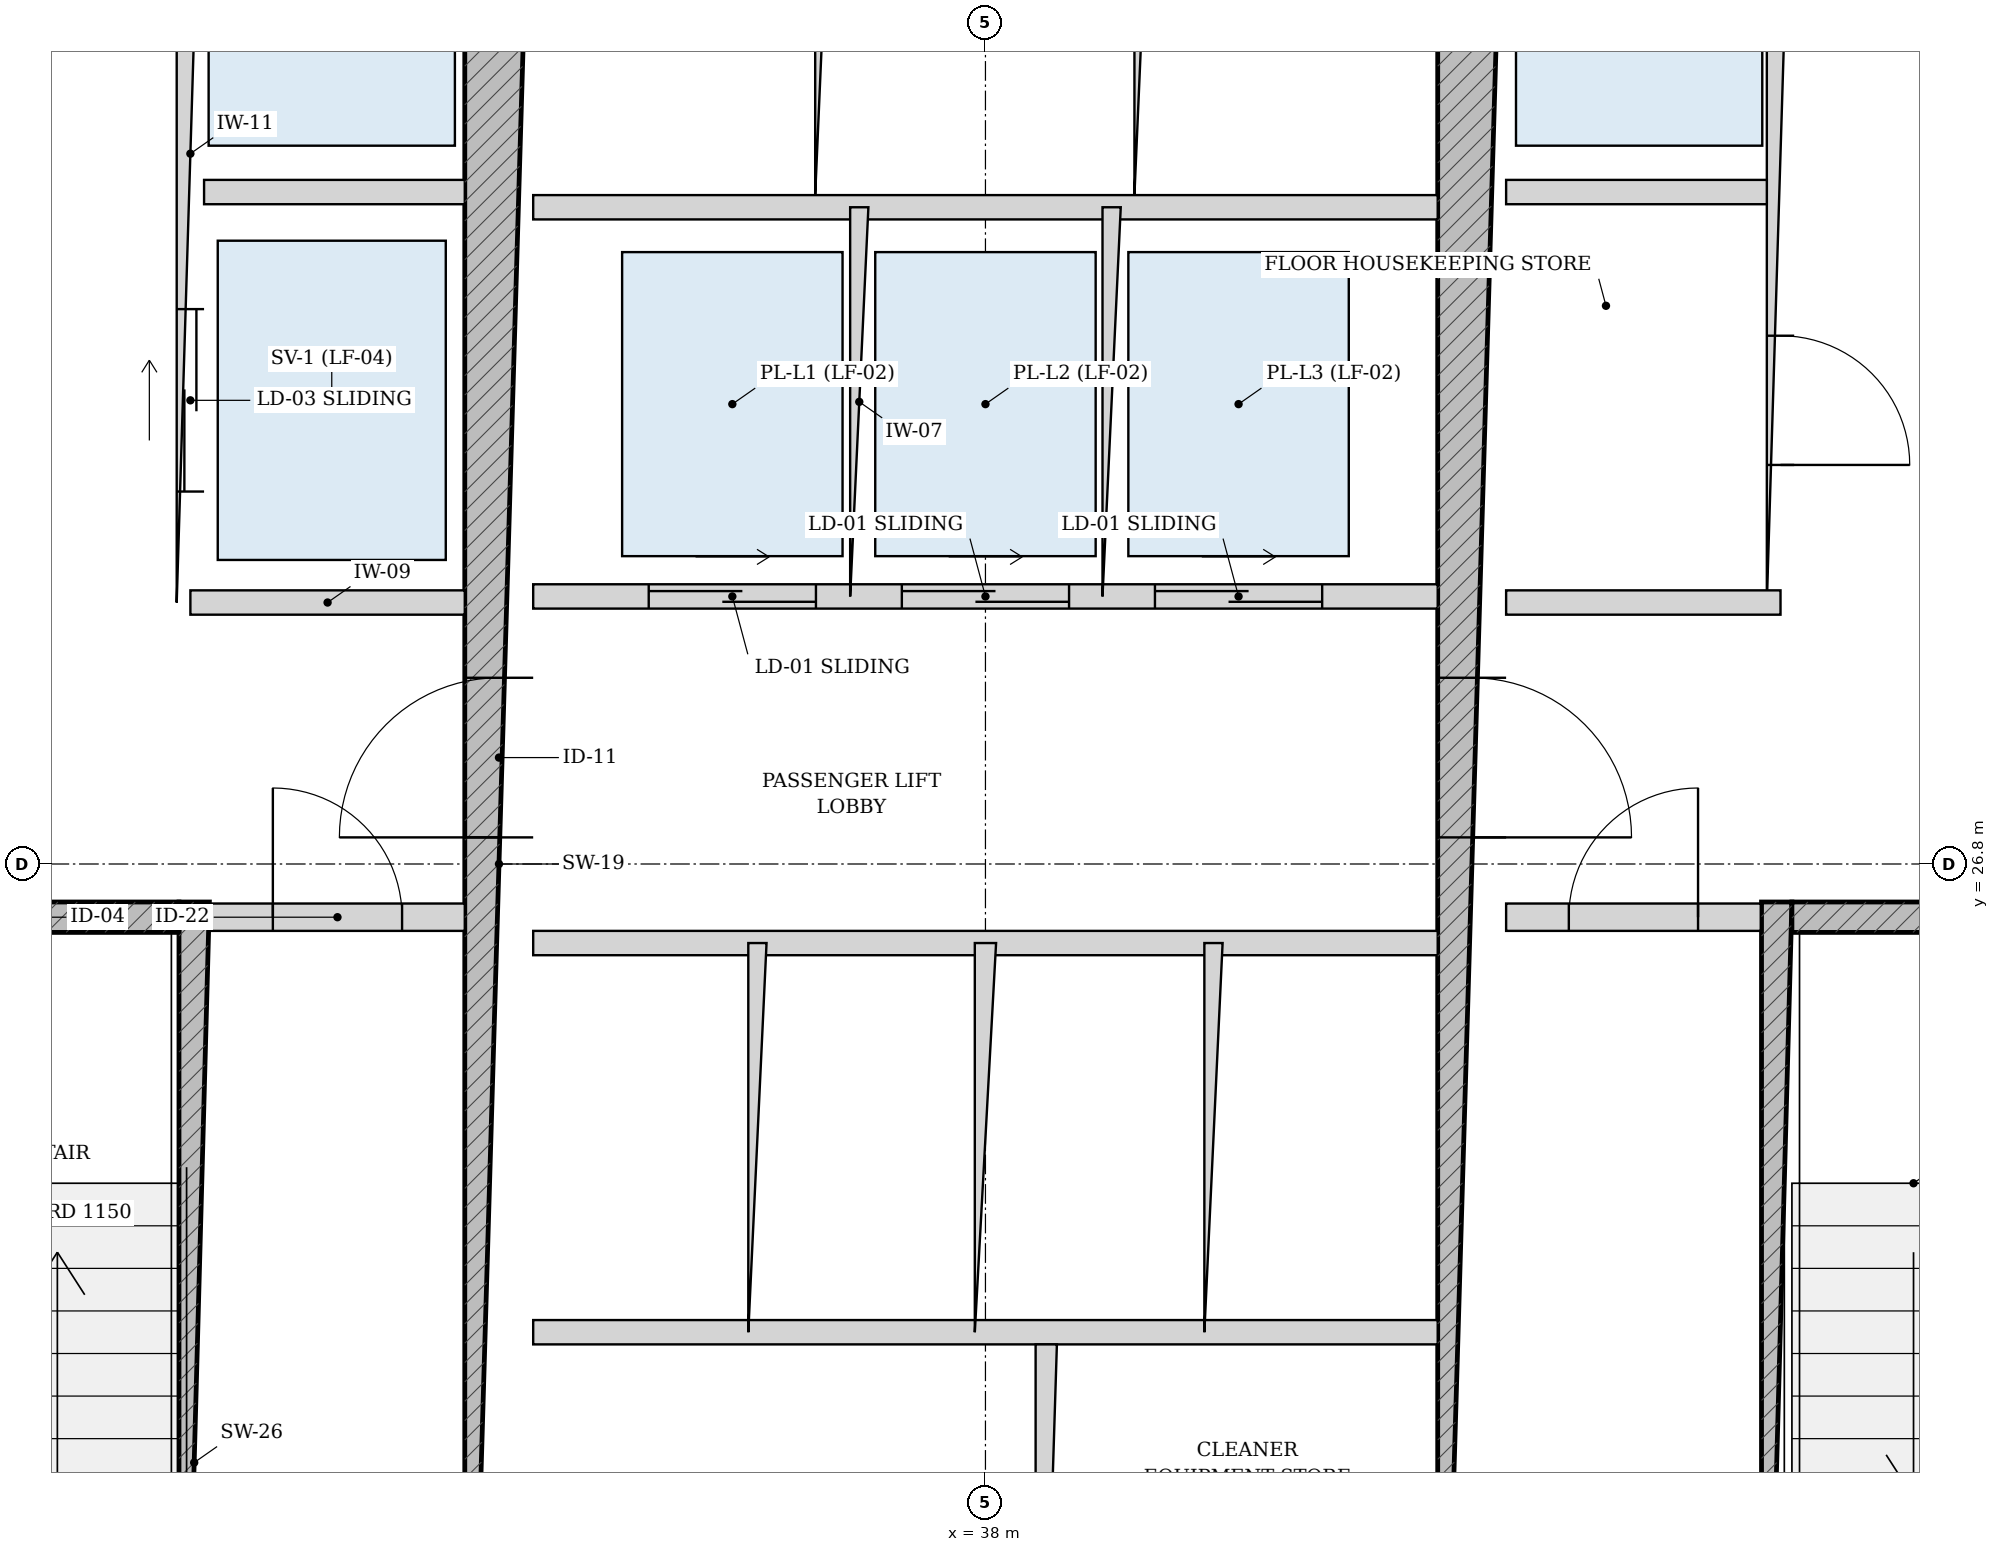
"""IFC4 building model, lengths in metres.
Left out: names, types, materials, properties, quantities, classifications, styles, units other than length and angle.
Written with IfcOpenShell. Run it as: python <this file> out.ifc"""

import sys

from ifc_helpers import new_model, si_unit, direction, frame, frame_2d, origin, place, context, subcontext, project, spatial, rectangle, extrude, source, transform, mapped, element, fill, save


model = new_model("IFC4")
c1 = context("Model", 3, precision=1e-05, world=origin(), true_north=direction((-0.2419218956, 0.970295726276)))
c2 = subcontext(c1, "Body", "Model", "MODEL_VIEW")
j1 = project(units=[si_unit("LENGTHUNIT", "METRE"), si_unit("PLANEANGLEUNIT", "RADIAN")], contexts=[c1])
p1 = place(None, origin())
s1 = spatial("IfcSite", under=j1, at=p1, CompositionType="ELEMENT")
p2 = place(p1, origin())
s2 = spatial("IfcBuilding", under=s1, at=p2, CompositionType="ELEMENT")
p3 = place(p2, frame((0.0, 0.0, 79.8)))
s3 = spatial("IfcBuildingStorey", under=s2, at=p3, CompositionType="ELEMENT", Elevation=79.8)
p4 = place(p3, frame((32.795, 19.175, 0.0), z_axis=(0.0, 0.0, 1.0), x_axis=(0.0, 1.0, 0.0)))
e1 = element("IfcWall", 1, at=p4, inside=s3, PredefinedType="SOLIDWALL", context=c2, shape_type="SweptSolid", body=[
    extrude(rectangle(XDim=7.375, YDim=0.2, at=frame_2d((3.688, 0.0))), origin(), (0.0, 0.0, 1.0), 3.325),
])
p5 = place(p3, frame((29.375, 26.45, 0.0), z_axis=(0.0, 0.0, 1.0), x_axis=(1.0, 0.0, 0.0)))
e2 = element("IfcWall", 2, at=p5, inside=s3, PredefinedType="SOLIDWALL", context=c2, shape_type="SweptSolid", body=[
    extrude(rectangle(XDim=3.32, YDim=0.2, at=frame_2d((1.66, 0.0))), origin(), (0.0, 0.0, 1.0), 3.325),
])
p6 = place(p5, frame((1.185, 0.0, 0.0)))
e3 = element("IfcOpeningElement", 3, at=p6, cuts=e2, PredefinedType="OPENING", context=c2, shape_type="SweptSolid", body=[
    extrude(rectangle(XDim=0.95, YDim=2.15, at=frame_2d((0.475, 1.075))), frame((0.0, 0.11, 0.0), z_axis=(0.0, -1.0, 0.0), x_axis=(1.0, 0.0, 0.0)), (0.0, 0.0, 1.0), 0.22),
])
p7 = place(p3, frame((43.205, 19.175, 0.0), z_axis=(0.0, 0.0, 1.0), x_axis=(0.0, 1.0, 0.0)))
e4 = element("IfcWall", 4, at=p7, inside=s3, PredefinedType="SOLIDWALL", context=c2, shape_type="SweptSolid", body=[
    extrude(rectangle(XDim=7.375, YDim=0.2, at=frame_2d((3.688, 0.0))), origin(), (0.0, 0.0, 1.0), 3.325),
])
p8 = place(p3, frame((43.305, 26.45, 0.0), z_axis=(0.0, 0.0, 1.0), x_axis=(1.0, 0.0, 0.0)))
e5 = element("IfcWall", 5, at=p8, inside=s3, PredefinedType="SOLIDWALL", context=c2, shape_type="SweptSolid", body=[
    extrude(rectangle(XDim=3.32, YDim=0.2, at=frame_2d((1.66, 0.0))), origin(), (0.0, 0.0, 1.0), 3.325),
])
p9 = place(p8, frame((1.185, 0.0, 0.0)))
e6 = element("IfcOpeningElement", 6, at=p9, cuts=e5, PredefinedType="OPENING", context=c2, shape_type="SweptSolid", body=[
    extrude(rectangle(XDim=0.95, YDim=2.15, at=frame_2d((0.475, 1.075))), frame((0.0, 0.11, 0.0), z_axis=(0.0, -1.0, 0.0), x_axis=(1.0, 0.0, 0.0)), (0.0, 0.0, 1.0), 0.22),
])
p10 = place(p3, frame((34.8, 19.175, 0.0), z_axis=(0.0, 0.0, 1.0), x_axis=(0.0, 1.0, 0.0)))
e7 = element("IfcWall", 7, at=p10, inside=s3, PredefinedType="SHEAR", context=c2, shape_type="SweptSolid", body=[
    extrude(rectangle(XDim=15.25, YDim=0.45, at=frame_2d((7.625, 0.0))), origin(), (0.0, 0.0, 1.0), 3.325),
])
p11 = place(p10, frame((7.8, 0.0, 0.0)))
e8 = element("IfcOpeningElement", 8, at=p11, cuts=e7, PredefinedType="OPENING", context=c2, shape_type="SweptSolid", body=[
    extrude(rectangle(XDim=1.05, YDim=2.15, at=frame_2d((0.525, 1.075))), frame((0.0, 0.235, 0.0), z_axis=(0.0, -1.0, 0.0), x_axis=(1.0, 0.0, 0.0)), (0.0, 0.0, 1.0), 0.47),
])
p12 = place(p3, frame((41.2, 19.175, 0.0), z_axis=(0.0, 0.0, 1.0), x_axis=(0.0, 1.0, 0.0)))
e9 = element("IfcWall", 9, at=p12, inside=s3, PredefinedType="SHEAR", context=c2, shape_type="SweptSolid", body=[
    extrude(rectangle(XDim=15.25, YDim=0.45, at=frame_2d((7.625, 0.0))), origin(), (0.0, 0.0, 1.0), 3.325),
])
p13 = place(p12, frame((7.8, 0.0, 0.0)))
e10 = element("IfcOpeningElement", 10, at=p13, cuts=e9, PredefinedType="OPENING", context=c2, shape_type="SweptSolid", body=[
    extrude(rectangle(XDim=1.05, YDim=2.15, at=frame_2d((0.525, 1.075))), frame((0.0, 0.235, 0.0), z_axis=(0.0, -1.0, 0.0), x_axis=(1.0, 0.0, 0.0)), (0.0, 0.0, 1.0), 0.47),
])
p14 = place(p3, frame((32.9, 26.45, 0.0), z_axis=(0.0, 0.0, 1.0), x_axis=(1.0, 0.0, 0.0)))
e11 = element("IfcWall", 11, at=p14, inside=s3, PredefinedType="PARTITIONING", context=c2, shape_type="SweptSolid", body=[
    extrude(rectangle(XDim=1.675, YDim=0.18, at=frame_2d((0.837, 0.0))), origin(), (0.0, 0.0, 1.0), 3.325),
])
p15 = place(p14, frame((0.413, 0.0, 0.0)))
e12 = element("IfcOpeningElement", 12, at=p15, cuts=e11, PredefinedType="OPENING", context=c2, shape_type="SweptSolid", body=[
    extrude(rectangle(XDim=0.85, YDim=2.1, at=frame_2d((0.425, 1.05))), frame((0.0, 0.1, 0.0), z_axis=(0.0, -1.0, 0.0), x_axis=(1.0, 0.0, 0.0)), (0.0, 0.0, 1.0), 0.2),
])
p16 = place(p3, frame((41.425, 26.45, 0.0), z_axis=(0.0, 0.0, 1.0), x_axis=(1.0, 0.0, 0.0)))
e13 = element("IfcWall", 13, at=p16, inside=s3, PredefinedType="PARTITIONING", context=c2, shape_type="SweptSolid", body=[
    extrude(rectangle(XDim=1.675, YDim=0.18, at=frame_2d((0.837, 0.0))), origin(), (0.0, 0.0, 1.0), 3.325),
])
p17 = place(p16, frame((0.413, 0.0, 0.0)))
e14 = element("IfcOpeningElement", 14, at=p17, cuts=e13, PredefinedType="OPENING", context=c2, shape_type="SweptSolid", body=[
    extrude(rectangle(XDim=0.85, YDim=2.1, at=frame_2d((0.425, 1.05))), frame((0.0, 0.1, 0.0), z_axis=(0.0, -1.0, 0.0), x_axis=(1.0, 0.0, 0.0)), (0.0, 0.0, 1.0), 0.2),
])
p18 = place(p3, frame((32.77, 28.52, 0.0), z_axis=(0.0, 0.0, 1.0), x_axis=(0.0, 1.0, 0.0)))
e15 = element("IfcWall", 15, at=p18, inside=s3, PredefinedType="PARTITIONING", context=c2, shape_type="SweptSolid", body=[
    extrude(rectangle(XDim=5.905, YDim=0.18, at=frame_2d((2.953, 0.0))), origin(), (0.0, 0.0, 1.0), 3.325),
])
p19 = place(p18, frame((3.655, 0.0, 0.0)))
e16 = element("IfcOpeningElement", 16, at=p19, cuts=e15, PredefinedType="OPENING", context=c2, shape_type="SweptSolid", body=[
    extrude(rectangle(XDim=1.15, YDim=2.2, at=frame_2d((0.575, 1.1))), frame((0.0, 0.1, 0.0), z_axis=(0.0, -1.0, 0.0), x_axis=(1.0, 0.0, 0.0)), (0.0, 0.0, 1.0), 0.2),
])
p20 = place(p18, frame((0.73, 0.0, 0.0)))
e17 = element("IfcOpeningElement", 17, at=p20, cuts=e15, PredefinedType="OPENING", context=c2, shape_type="SweptSolid", body=[
    extrude(rectangle(XDim=1.2, YDim=2.25, at=frame_2d((0.6, 1.125))), frame((0.0, 0.1, 0.0), z_axis=(0.0, -1.0, 0.0), x_axis=(1.0, 0.0, 0.0)), (0.0, 0.0, 1.0), 0.2),
])
p21 = place(p3, frame((32.86, 31.22, 0.0), z_axis=(0.0, 0.0, 1.0), x_axis=(1.0, 0.0, 0.0)))
e18 = element("IfcWall", 18, at=p21, inside=s3, PredefinedType="PARTITIONING", context=c2, shape_type="SweptSolid", body=[
    extrude(rectangle(XDim=1.715, YDim=0.16, at=frame_2d((0.857, 0.0))), origin(), (0.0, 0.0, 1.0), 3.325),
])
p22 = place(p3, frame((32.77, 28.52, 0.0), z_axis=(0.0, 0.0, 1.0), x_axis=(1.0, 0.0, 0.0)))
e19 = element("IfcWall", 19, at=p22, inside=s3, PredefinedType="PARTITIONING", context=c2, shape_type="SweptSolid", body=[
    extrude(rectangle(XDim=1.805, YDim=0.16, at=frame_2d((0.902, 0.0))), origin(), (0.0, 0.0, 1.0), 3.325),
])
p23 = place(p3, frame((43.23, 28.52, 0.0), z_axis=(0.0, 0.0, 1.0), x_axis=(0.0, 1.0, 0.0)))
e20 = element("IfcWall", 20, at=p23, inside=s3, PredefinedType="PARTITIONING", context=c2, shape_type="SweptSolid", body=[
    extrude(rectangle(XDim=5.905, YDim=0.18, at=frame_2d((2.953, 0.0))), origin(), (0.0, 0.0, 1.0), 3.325),
])
p24 = place(p23, frame((0.905, 0.0, 0.0)))
e21 = element("IfcOpeningElement", 21, at=p24, cuts=e20, PredefinedType="OPENING", context=c2, shape_type="SweptSolid", body=[
    extrude(rectangle(XDim=0.85, YDim=2.1, at=frame_2d((0.425, 1.05))), frame((0.0, 0.1, 0.0), z_axis=(0.0, -1.0, 0.0), x_axis=(1.0, 0.0, 0.0)), (0.0, 0.0, 1.0), 0.2),
])
p25 = place(p23, frame((3.655, 0.0, 0.0)))
e22 = element("IfcOpeningElement", 22, at=p25, cuts=e20, PredefinedType="OPENING", context=c2, shape_type="SweptSolid", body=[
    extrude(rectangle(XDim=1.15, YDim=2.2, at=frame_2d((0.575, 1.1))), frame((0.0, 0.1, 0.0), z_axis=(0.0, -1.0, 0.0), x_axis=(1.0, 0.0, 0.0)), (0.0, 0.0, 1.0), 0.2),
])
p26 = place(p3, frame((41.425, 31.22, 0.0), z_axis=(0.0, 0.0, 1.0), x_axis=(1.0, 0.0, 0.0)))
e23 = element("IfcWall", 23, at=p26, inside=s3, PredefinedType="PARTITIONING", context=c2, shape_type="SweptSolid", body=[
    extrude(rectangle(XDim=1.715, YDim=0.16, at=frame_2d((0.857, 0.0))), origin(), (0.0, 0.0, 1.0), 3.325),
])
p27 = place(p3, frame((41.425, 28.52, 0.0), z_axis=(0.0, 0.0, 1.0), x_axis=(1.0, 0.0, 0.0)))
e24 = element("IfcWall", 24, at=p27, inside=s3, PredefinedType="PARTITIONING", context=c2, shape_type="SweptSolid", body=[
    extrude(rectangle(XDim=1.805, YDim=0.16, at=frame_2d((0.902, 0.0))), origin(), (0.0, 0.0, 1.0), 3.325),
])
p28 = place(p3, frame((35.025, 28.56, 0.0), z_axis=(0.0, 0.0, 1.0), x_axis=(1.0, 0.0, 0.0)))
e25 = element("IfcWall", 25, at=p28, inside=s3, PredefinedType="PARTITIONING", context=c2, shape_type="SweptSolid", body=[
    extrude(rectangle(XDim=5.95, YDim=0.16, at=frame_2d((2.975, 0.0))), origin(), (0.0, 0.0, 1.0), 3.325),
])
p29 = place(p28, frame((0.76, 0.0, 0.0)))
e26 = element("IfcOpeningElement", 26, at=p29, cuts=e25, PredefinedType="OPENING", context=c2, shape_type="SweptSolid", body=[
    extrude(rectangle(XDim=1.1, YDim=2.2, at=frame_2d((0.55, 1.1))), frame((0.0, 0.09, 0.0), z_axis=(0.0, -1.0, 0.0), x_axis=(1.0, 0.0, 0.0)), (0.0, 0.0, 1.0), 0.18),
])
p30 = place(p28, frame((2.425, 0.0, 0.0)))
e27 = element("IfcOpeningElement", 27, at=p30, cuts=e25, PredefinedType="OPENING", context=c2, shape_type="SweptSolid", body=[
    extrude(rectangle(XDim=1.1, YDim=2.2, at=frame_2d((0.55, 1.1))), frame((0.0, 0.09, 0.0), z_axis=(0.0, -1.0, 0.0), x_axis=(1.0, 0.0, 0.0)), (0.0, 0.0, 1.0), 0.18),
])
p31 = place(p28, frame((4.09, 0.0, 0.0)))
e28 = element("IfcOpeningElement", 28, at=p31, cuts=e25, PredefinedType="OPENING", context=c2, shape_type="SweptSolid", body=[
    extrude(rectangle(XDim=1.1, YDim=2.2, at=frame_2d((0.55, 1.1))), frame((0.0, 0.09, 0.0), z_axis=(0.0, -1.0, 0.0), x_axis=(1.0, 0.0, 0.0)), (0.0, 0.0, 1.0), 0.18),
])
p32 = place(p3, frame((35.025, 31.12, 0.0), z_axis=(0.0, 0.0, 1.0), x_axis=(1.0, 0.0, 0.0)))
e29 = element("IfcWall", 29, at=p32, inside=s3, PredefinedType="PARTITIONING", context=c2, shape_type="SweptSolid", body=[
    extrude(rectangle(XDim=5.95, YDim=0.16, at=frame_2d((2.975, 0.0))), origin(), (0.0, 0.0, 1.0), 3.325),
])
for number, where, z_axis, x_axis in (
    (30, (37.17, 28.56, 0.0), (0.0, 0.0, 1.0), (0.0, 1.0, 0.0)),
    (31, (38.83, 28.56, 0.0), (0.0, 0.0, 1.0), (0.0, 1.0, 0.0)),
):
    element("IfcWall", number, at=place(p3, frame(where, z_axis=z_axis, x_axis=x_axis)), inside=s3, PredefinedType="PARTITIONING", context=c2, shape_type="SweptSolid", body=[
        extrude(rectangle(XDim=2.56, YDim=0.12, at=frame_2d((1.28, 0.0))), origin(), (0.0, 0.0, 1.0), 3.325),
    ])
for number, where, z_axis, x_axis in (
    (32, (36.95, 31.2, 0.0), (0.0, 0.0, 1.0), (0.0, 1.0, 0.0)),
    (33, (39.05, 31.2, 0.0), (0.0, 0.0, 1.0), (0.0, 1.0, 0.0)),
):
    element("IfcWall", number, at=place(p3, frame(where, z_axis=z_axis, x_axis=x_axis)), inside=s3, PredefinedType="PARTITIONING", context=c2, shape_type="SweptSolid", body=[
        extrude(rectangle(XDim=3.225, YDim=0.14, at=frame_2d((1.613, 0.0))), origin(), (0.0, 0.0, 1.0), 3.325),
    ])
for number, where, z_axis, x_axis in (
    (34, (35.025, 26.28, 0.0), (0.0, 0.0, 1.0), (1.0, 0.0, 0.0)),
    (35, (35.025, 23.72, 0.0), (0.0, 0.0, 1.0), (1.0, 0.0, 0.0)),
):
    element("IfcWall", number, at=place(p3, frame(where, z_axis=z_axis, x_axis=x_axis)), inside=s3, PredefinedType="PARTITIONING", context=c2, shape_type="SweptSolid", body=[
        extrude(rectangle(XDim=5.95, YDim=0.16, at=frame_2d((2.975, 0.0))), origin(), (0.0, 0.0, 1.0), 3.325),
    ])
p33 = place(p3, frame((36.5, 23.72, 0.0), z_axis=(0.0, 0.0, 1.0), x_axis=(0.0, 1.0, 0.0)))
e36 = element("IfcWall", 36, at=p33, inside=s3, PredefinedType="PARTITIONING", context=c2, shape_type="SweptSolid", body=[
    extrude(rectangle(XDim=2.56, YDim=0.12, at=frame_2d((1.28, 0.0))), origin(), (0.0, 0.0, 1.0), 3.325),
])
p34 = place(p3, frame((38.0, 23.72, 0.0), z_axis=(0.0, 0.0, 1.0), x_axis=(0.0, 1.0, 0.0)))
e37 = element("IfcWall", 37, at=p34, inside=s3, PredefinedType="PARTITIONING", context=c2, shape_type="SweptSolid", body=[
    extrude(rectangle(XDim=2.56, YDim=0.14, at=frame_2d((1.28, 0.0))), origin(), (0.0, 0.0, 1.0), 3.325),
])
p35 = place(p3, frame((39.5, 23.72, 0.0), z_axis=(0.0, 0.0, 1.0), x_axis=(0.0, 1.0, 0.0)))
e38 = element("IfcWall", 38, at=p35, inside=s3, PredefinedType="PARTITIONING", context=c2, shape_type="SweptSolid", body=[
    extrude(rectangle(XDim=2.56, YDim=0.12, at=frame_2d((1.28, 0.0))), origin(), (0.0, 0.0, 1.0), 3.325),
])
p36 = place(p3, frame((38.4, 19.175, 0.0), z_axis=(0.0, 0.0, 1.0), x_axis=(0.0, 1.0, 0.0)))
e39 = element("IfcWall", 39, at=p36, inside=s3, PredefinedType="PARTITIONING", context=c2, shape_type="SweptSolid", body=[
    extrude(rectangle(XDim=4.465, YDim=0.14, at=frame_2d((2.232, 0.0))), origin(), (0.0, 0.0, 1.0), 3.325),
])
m1 = source(origin(), c2, "Body", "SweptSolid", [
    extrude(rectangle(XDim=1.05, YDim=2.15, at=frame_2d((0.525, 1.075))), frame((0.0, 0.025, 0.0), z_axis=(0.0, -1.0, 0.0), x_axis=(1.0, 0.0, 0.0)), (0.0, 0.0, 1.0), 0.05),
])
p37 = place(p11, origin())
e40 = element("IfcDoor", 40, at=p37, inside=s3, OperationType="SINGLE_SWING_LEFT", PredefinedType="DOOR", context=c2, shape_type="MappedRepresentation", body=[
    mapped(m1, transform((0.0, 0.0, 0.0), scale=1.0)),
])
fill(e8, e40)
p38 = place(p13, frame((1.05, 0.0, 0.0), z_axis=(0.0, 0.0, 1.0), x_axis=(-1.0, 0.0, 0.0)))
e41 = element("IfcDoor", 41, at=p38, inside=s3, OperationType="SINGLE_SWING_RIGHT", PredefinedType="DOOR", context=c2, shape_type="MappedRepresentation", body=[
    mapped(m1, transform((0.0, 0.0, 0.0), scale=1.0)),
])
fill(e10, e41)
m2 = source(origin(), c2, "Body", "SweptSolid", [
    extrude(rectangle(XDim=0.85, YDim=2.1, at=frame_2d((0.425, 1.05))), frame((0.0, 0.025, 0.0), z_axis=(0.0, -1.0, 0.0), x_axis=(1.0, 0.0, 0.0)), (0.0, 0.0, 1.0), 0.05),
])
p39 = place(p15, origin())
e42 = element("IfcDoor", 42, at=p39, inside=s3, OperationType="SINGLE_SWING_LEFT", PredefinedType="DOOR", context=c2, shape_type="MappedRepresentation", body=[
    mapped(m2, transform((0.0, 0.0, 0.0), scale=1.0)),
])
fill(e12, e42)
p40 = place(p17, origin())
e43 = element("IfcDoor", 43, at=p40, inside=s3, OperationType="SINGLE_SWING_RIGHT", PredefinedType="DOOR", context=c2, shape_type="MappedRepresentation", body=[
    mapped(m2, transform((0.0, 0.0, 0.0), scale=1.0)),
])
fill(e14, e43)
p41 = place(p24, frame((0.85, 0.0, 0.0), z_axis=(0.0, 0.0, 1.0), x_axis=(-1.0, 0.0, 0.0)))
e44 = element("IfcDoor", 44, at=p41, inside=s3, OperationType="SINGLE_SWING_RIGHT", PredefinedType="DOOR", context=c2, shape_type="MappedRepresentation", body=[
    mapped(m2, transform((0.0, 0.0, 0.0), scale=1.0)),
])
fill(e21, e44)
m3 = source(origin(), c2, "Body", "SweptSolid", [
    extrude(rectangle(XDim=1.2, YDim=2.25, at=frame_2d((0.6, 1.125))), frame((0.0, 0.025, 0.0), z_axis=(0.0, -1.0, 0.0), x_axis=(1.0, 0.0, 0.0)), (0.0, 0.0, 1.0), 0.05),
])
p42 = place(p20, origin())
e45 = element("IfcDoor", 45, at=p42, inside=s3, OperationType="DOUBLE_DOOR_SLIDING", PredefinedType="DOOR", context=c2, shape_type="MappedRepresentation", body=[
    mapped(m3, transform((0.0, 0.0, 0.0), scale=1.0)),
])
fill(e17, e45)
m4 = source(origin(), c2, "Body", "SweptSolid", [
    extrude(rectangle(XDim=1.1, YDim=2.2, at=frame_2d((0.55, 1.1))), frame((0.0, 0.025, 0.0), z_axis=(0.0, -1.0, 0.0), x_axis=(1.0, 0.0, 0.0)), (0.0, 0.0, 1.0), 0.05),
])
p43 = place(p29, origin())
e46 = element("IfcDoor", 46, at=p43, inside=s3, OperationType="DOUBLE_DOOR_SLIDING", PredefinedType="DOOR", context=c2, shape_type="MappedRepresentation", body=[
    mapped(m4, transform((0.0, 0.0, 0.0), scale=1.0)),
])
fill(e26, e46)
p44 = place(p30, origin())
e47 = element("IfcDoor", 47, at=p44, inside=s3, OperationType="DOUBLE_DOOR_SLIDING", PredefinedType="DOOR", context=c2, shape_type="MappedRepresentation", body=[
    mapped(m4, transform((0.0, 0.0, 0.0), scale=1.0)),
])
fill(e27, e47)
p45 = place(p31, origin())
e48 = element("IfcDoor", 48, at=p45, inside=s3, OperationType="DOUBLE_DOOR_SLIDING", PredefinedType="DOOR", context=c2, shape_type="MappedRepresentation", body=[
    mapped(m4, transform((0.0, 0.0, 0.0), scale=1.0)),
])
fill(e28, e48)
save(model, sys.argv[1])
